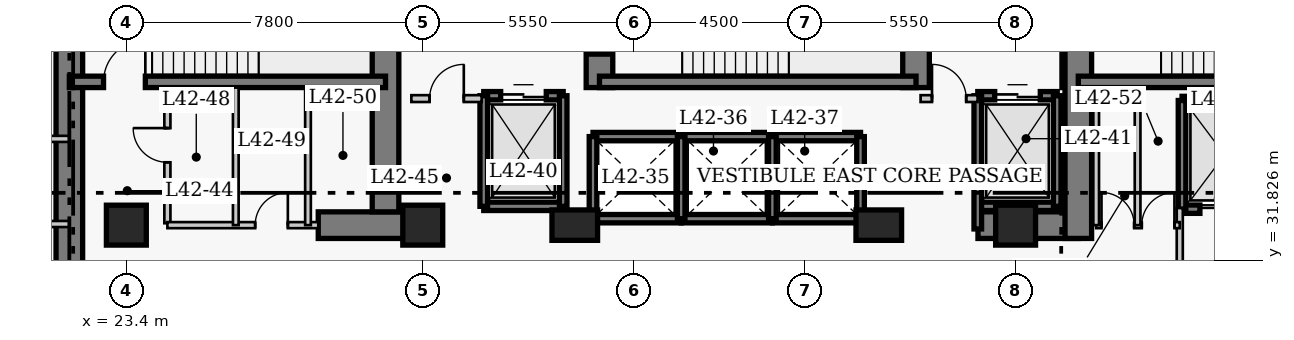
"""IFC4 building model, lengths in metres.
Left out: names, types, materials, properties, quantities, classifications, styles, units other than length and angle.
Written with IfcOpenShell. Run it as: python <this file> out.ifc"""

import sys

from ifc_helpers import new_model, si_unit, direction, frame, frame_2d, origin, origin_2d, place, context, subcontext, project, spatial, rectangle, extrude, element, fill, save


model = new_model("IFC4")
c1 = context("Model", 3, precision=1e-05, world=origin(), true_north=direction((0.0, 1.0)))
c2 = subcontext(c1, "Body", "Model", "MODEL_VIEW")
j1 = project(units=[si_unit("LENGTHUNIT", "METRE"), si_unit("PLANEANGLEUNIT", "RADIAN")], contexts=[c1])
p1 = place(None, origin())
s1 = spatial("IfcSite", under=j1, at=p1, CompositionType="ELEMENT")
p2 = place(p1, origin())
s2 = spatial("IfcBuilding", under=s1, at=p2, CompositionType="ELEMENT")
p3 = place(p2, frame((0.0, 0.0, 168.8)))
s3 = spatial("IfcBuildingStorey", under=s2, at=p3, CompositionType="ELEMENT", Elevation=168.8)
p4 = place(p3, frame((21.9, 27.05, 0.0), z_axis=(0.0, 0.0, 1.0), x_axis=(0.0, 1.0, 0.0)))
e1 = element("IfcWall", 1, at=p4, inside=s3, PredefinedType="SHEAR", context=c2, shape_type="SweptSolid", body=[
    extrude(rectangle(XDim=13.62, YDim=0.7, at=frame_2d((6.81, 0.0))), origin(), (0.0, 0.0, 1.0), 3.8),
])
p5 = place(p3, frame((28.45, 32.75, 0.0), z_axis=(0.0, 0.0, 1.0), x_axis=(1.0, 0.0, 0.0)))
e2 = element("IfcWall", 2, at=p5, inside=s3, PredefinedType="SHEAR", context=c2, shape_type="SweptSolid", body=[
    extrude(rectangle(XDim=2.4, YDim=0.7, at=frame_2d((1.2, 0.0))), origin(), (0.0, 0.0, 1.0), 3.8),
])
p6 = place(p3, frame((45.81, 32.75, 0.0), z_axis=(0.0, 0.0, 1.0), x_axis=(1.0, 0.0, 0.0)))
e3 = element("IfcWall", 3, at=p6, inside=s3, PredefinedType="SHEAR", context=c2, shape_type="SweptSolid", body=[
    extrude(rectangle(XDim=2.64, YDim=0.7, at=frame_2d((1.32, 0.0))), origin(), (0.0, 0.0, 1.0), 3.8),
])
p7 = place(p3, frame((30.22, 33.1, 0.0), z_axis=(0.0, 0.0, 1.0), x_axis=(0.0, 1.0, 0.0)))
e4 = element("IfcWall", 4, at=p7, inside=s3, PredefinedType="SHEAR", context=c2, shape_type="SweptSolid", body=[
    extrude(rectangle(XDim=7.22, YDim=0.7, at=frame_2d((3.61, 0.0))), origin(), (0.0, 0.0, 1.0), 3.8),
])
p8 = place(p3, frame((35.85, 36.37, 0.0), z_axis=(0.0, 0.0, 1.0), x_axis=(0.0, 1.0, 0.0)))
e5 = element("IfcWall", 5, at=p8, inside=s3, PredefinedType="SHEAR", context=c2, shape_type="SweptSolid", body=[
    extrude(rectangle(XDim=3.95, YDim=0.7, at=frame_2d((1.975, 0.0))), origin(), (0.0, 0.0, 1.0), 3.8),
])
p9 = place(p8, frame((0.88, 0.0, 0.0)))
e6 = element("IfcOpeningElement", 6, at=p9, cuts=e5, PredefinedType="OPENING", context=c2, shape_type="SweptSolid", body=[
    extrude(rectangle(XDim=1.1, YDim=2.15, at=frame_2d((0.55, 1.075))), frame((0.0, 0.36, 0.0), z_axis=(0.0, -1.0, 0.0), x_axis=(1.0, 0.0, 0.0)), (0.0, 0.0, 1.0), 0.72),
])
p10 = place(p3, frame((44.18, 36.37, 0.0), z_axis=(0.0, 0.0, 1.0), x_axis=(0.0, 1.0, 0.0)))
e7 = element("IfcWall", 7, at=p10, inside=s3, PredefinedType="SHEAR", context=c2, shape_type="SweptSolid", body=[
    extrude(rectangle(XDim=3.95, YDim=0.7, at=frame_2d((1.975, 0.0))), origin(), (0.0, 0.0, 1.0), 3.8),
])
p11 = place(p3, frame((48.45, 32.4, 0.0), z_axis=(0.0, 0.0, 1.0), x_axis=(0.0, 1.0, 0.0)))
e8 = element("IfcWall", 8, at=p11, inside=s3, PredefinedType="SHEAR", context=c2, shape_type="SweptSolid", body=[
    extrude(rectangle(XDim=7.92, YDim=0.7, at=frame_2d((3.96, 0.0))), origin(), (0.0, 0.0, 1.0), 3.8),
])
p12 = place(p11, frame((5.8, 0.0, 0.0)))
e9 = element("IfcOpeningElement", 9, at=p12, cuts=e8, PredefinedType="OPENING", context=c2, shape_type="SweptSolid", body=[
    extrude(rectangle(XDim=1.1, YDim=2.15, at=frame_2d((0.55, 1.075))), frame((0.0, 0.36, 0.0), z_axis=(0.0, -1.0, 0.0), x_axis=(1.0, 0.0, 0.0)), (0.0, 0.0, 1.0), 0.72),
])
p13 = place(p3, frame((21.9, 36.52, 0.0), z_axis=(0.0, 0.0, 1.0), x_axis=(1.0, 0.0, 0.0)))
e10 = element("IfcWall", 10, at=p13, inside=s3, PredefinedType="SHEAR", context=c2, shape_type="SweptSolid", body=[
    extrude(rectangle(XDim=8.32, YDim=0.3, at=frame_2d((4.16, 0.0))), origin(), (0.0, 0.0, 1.0), 3.8),
])
p14 = place(p13, frame((0.9, 0.0, 0.0)))
e11 = element("IfcOpeningElement", 11, at=p14, cuts=e10, PredefinedType="OPENING", context=c2, shape_type="SweptSolid", body=[
    extrude(rectangle(XDim=1.1, YDim=2.15, at=frame_2d((0.55, 1.075))), frame((0.0, 0.16, 0.0), z_axis=(0.0, -1.0, 0.0), x_axis=(1.0, 0.0, 0.0)), (0.0, 0.0, 1.0), 0.32),
])
p15 = place(p3, frame((35.85, 36.52, 0.0), z_axis=(0.0, 0.0, 1.0), x_axis=(1.0, 0.0, 0.0)))
e12 = element("IfcWall", 12, at=p15, inside=s3, PredefinedType="SHEAR", context=c2, shape_type="SweptSolid", body=[
    extrude(rectangle(XDim=8.33, YDim=0.3, at=frame_2d((4.165, 0.0))), origin(), (0.0, 0.0, 1.0), 3.8),
])
p16 = place(p3, frame((48.45, 36.52, 0.0), z_axis=(0.0, 0.0, 1.0), x_axis=(1.0, 0.0, 0.0)))
e13 = element("IfcWall", 13, at=p16, inside=s3, PredefinedType="SHEAR", context=c2, shape_type="SweptSolid", body=[
    extrude(rectangle(XDim=8.42, YDim=0.3, at=frame_2d((4.21, 0.0))), origin(), (0.0, 0.0, 1.0), 3.8),
])
for number, where, z_axis, x_axis in (
    (14, (23.4, 32.75, 0.0), (0.0, 0.0, 1.0), (1.0, 0.0, 0.0)),
    (15, (31.2, 32.75, 0.0), (0.0, 0.0, 1.0), (1.0, 0.0, 0.0)),
):
    element("IfcColumn", number, at=place(p3, frame(where, z_axis=z_axis, x_axis=x_axis)), inside=s3, PredefinedType="COLUMN", context=c2, shape_type="SweptSolid", body=[
        extrude(rectangle(XDim=1.05, YDim=1.05, at=origin_2d()), origin(), (0.0, 0.0, 1.0), 3.8),
    ])
for number, where, z_axis, x_axis in (
    (16, (35.2, 32.75, 0.0), (0.0, 0.0, 1.0), (1.0, 0.0, 0.0)),
    (17, (43.2, 32.75, 0.0), (0.0, 0.0, 1.0), (1.0, 0.0, 0.0)),
):
    element("IfcColumn", number, at=place(p3, frame(where, z_axis=z_axis, x_axis=x_axis)), inside=s3, PredefinedType="COLUMN", context=c2, shape_type="SweptSolid", body=[
        extrude(rectangle(XDim=1.2, YDim=0.8, at=origin_2d()), origin(), (0.0, 0.0, 1.0), 3.8),
    ])
p17 = place(p3, frame((46.8, 32.75, 0.0), z_axis=(0.0, 0.0, 1.0), x_axis=(1.0, 0.0, 0.0)))
e18 = element("IfcColumn", 18, at=p17, inside=s3, PredefinedType="COLUMN", context=c2, shape_type="SweptSolid", body=[
    extrude(rectangle(XDim=1.05, YDim=1.05, at=origin_2d()), origin(), (0.0, 0.0, 1.0), 3.8),
])
for number, where, z_axis, x_axis in (
    (19, (35.68, 35.08, 0.0), (0.0, 0.0, 1.0), (1.0, 0.0, 0.0)),
    (20, (35.68, 32.92, 0.0), (0.0, 0.0, 1.0), (1.0, 0.0, 0.0)),
):
    element("IfcWall", number, at=place(p3, frame(where, z_axis=z_axis, x_axis=x_axis)), inside=s3, PredefinedType="SHEAR", context=c2, shape_type="SweptSolid", body=[
        extrude(rectangle(XDim=2.32, YDim=0.22, at=frame_2d((1.16, 0.0))), origin(), (0.0, 0.0, 1.0), 3.8),
    ])
p18 = place(p3, frame((35.68, 32.92, 0.0), z_axis=(0.0, 0.0, 1.0), x_axis=(0.0, 1.0, 0.0)))
e21 = element("IfcWall", 21, at=p18, inside=s3, PredefinedType="SHEAR", context=c2, shape_type="SweptSolid", body=[
    extrude(rectangle(XDim=2.16, YDim=0.2, at=frame_2d((1.08, 0.0))), origin(), (0.0, 0.0, 1.0), 3.8),
])
for number, where, z_axis, x_axis in (
    (22, (38.0, 35.08, 0.0), (0.0, 0.0, 1.0), (1.0, 0.0, 0.0)),
    (23, (38.0, 32.92, 0.0), (0.0, 0.0, 1.0), (1.0, 0.0, 0.0)),
):
    element("IfcWall", number, at=place(p3, frame(where, z_axis=z_axis, x_axis=x_axis)), inside=s3, PredefinedType="SHEAR", context=c2, shape_type="SweptSolid", body=[
        extrude(rectangle(XDim=2.4, YDim=0.22, at=frame_2d((1.2, 0.0))), origin(), (0.0, 0.0, 1.0), 3.8),
    ])
p19 = place(p3, frame((38.0, 32.92, 0.0), z_axis=(0.0, 0.0, 1.0), x_axis=(0.0, 1.0, 0.0)))
e24 = element("IfcWall", 24, at=p19, inside=s3, PredefinedType="SHEAR", context=c2, shape_type="SweptSolid", body=[
    extrude(rectangle(XDim=2.16, YDim=0.2, at=frame_2d((1.08, 0.0))), origin(), (0.0, 0.0, 1.0), 3.8),
])
for number, where, z_axis, x_axis in (
    (25, (40.4, 35.08, 0.0), (0.0, 0.0, 1.0), (1.0, 0.0, 0.0)),
    (26, (40.4, 32.92, 0.0), (0.0, 0.0, 1.0), (1.0, 0.0, 0.0)),
):
    element("IfcWall", number, at=place(p3, frame(where, z_axis=z_axis, x_axis=x_axis)), inside=s3, PredefinedType="SHEAR", context=c2, shape_type="SweptSolid", body=[
        extrude(rectangle(XDim=2.32, YDim=0.22, at=frame_2d((1.16, 0.0))), origin(), (0.0, 0.0, 1.0), 3.8),
    ])
for number, where, z_axis, x_axis in (
    (27, (40.4, 32.92, 0.0), (0.0, 0.0, 1.0), (0.0, 1.0, 0.0)),
    (28, (42.72, 32.92, 0.0), (0.0, 0.0, 1.0), (0.0, 1.0, 0.0)),
):
    element("IfcWall", number, at=place(p3, frame(where, z_axis=z_axis, x_axis=x_axis)), inside=s3, PredefinedType="SHEAR", context=c2, shape_type="SweptSolid", body=[
        extrude(rectangle(XDim=2.16, YDim=0.2, at=frame_2d((1.08, 0.0))), origin(), (0.0, 0.0, 1.0), 3.8),
    ])
p20 = place(p3, frame((51.18, 36.03, 0.0), z_axis=(0.0, 0.0, 1.0), x_axis=(1.0, 0.0, 0.0)))
e29 = element("IfcWall", 29, at=p20, inside=s3, PredefinedType="SHEAR", context=c2, shape_type="SweptSolid", body=[
    extrude(rectangle(XDim=2.42, YDim=0.22, at=frame_2d((1.21, 0.0))), origin(), (0.0, 0.0, 1.0), 3.8),
])
p21 = place(p3, frame((51.18, 33.17, 0.0), z_axis=(0.0, 0.0, 1.0), x_axis=(1.0, 0.0, 0.0)))
e30 = element("IfcWall", 30, at=p21, inside=s3, PredefinedType="SHEAR", context=c2, shape_type="SweptSolid", body=[
    extrude(rectangle(XDim=2.42, YDim=0.22, at=frame_2d((1.21, 0.0))), origin(), (0.0, 0.0, 1.0), 3.8),
])
p22 = place(p21, frame((0.47, 0.0, 0.0)))
e31 = element("IfcOpeningElement", 31, at=p22, cuts=e30, PredefinedType="OPENING", context=c2, shape_type="SweptSolid", body=[
    extrude(rectangle(XDim=1.3, YDim=2.15, at=frame_2d((0.65, 1.075))), frame((0.0, 0.12, 0.0), z_axis=(0.0, -1.0, 0.0), x_axis=(1.0, 0.0, 0.0)), (0.0, 0.0, 1.0), 0.24),
])
p23 = place(p3, frame((51.18, 33.17, 0.0), z_axis=(0.0, 0.0, 1.0), x_axis=(0.0, 1.0, 0.0)))
e32 = element("IfcWall", 32, at=p23, inside=s3, PredefinedType="SHEAR", context=c2, shape_type="SweptSolid", body=[
    extrude(rectangle(XDim=2.86, YDim=0.2, at=frame_2d((1.43, 0.0))), origin(), (0.0, 0.0, 1.0), 3.8),
])
p24 = place(p3, frame((32.805, 36.155, 0.0), z_axis=(0.0, 0.0, 1.0), x_axis=(1.0, 0.0, 0.0)))
e33 = element("IfcWall", 33, at=p24, inside=s3, PredefinedType="SHEAR", context=c2, shape_type="SweptSolid", body=[
    extrude(rectangle(XDim=2.09, YDim=0.22, at=frame_2d((1.045, 0.0))), origin(), (0.0, 0.0, 1.0), 3.8),
])
p25 = place(p24, frame((0.445, 0.0, 0.0)))
e34 = element("IfcOpeningElement", 34, at=p25, cuts=e33, PredefinedType="OPENING", context=c2, shape_type="SweptSolid", body=[
    extrude(rectangle(XDim=1.2, YDim=2.15, at=frame_2d((0.6, 1.075))), frame((0.0, 0.12, 0.0), z_axis=(0.0, -1.0, 0.0), x_axis=(1.0, 0.0, 0.0)), (0.0, 0.0, 1.0), 0.24),
])
p26 = place(p3, frame((32.805, 33.245, 0.0), z_axis=(0.0, 0.0, 1.0), x_axis=(1.0, 0.0, 0.0)))
e35 = element("IfcWall", 35, at=p26, inside=s3, PredefinedType="SHEAR", context=c2, shape_type="SweptSolid", body=[
    extrude(rectangle(XDim=2.09, YDim=0.22, at=frame_2d((1.045, 0.0))), origin(), (0.0, 0.0, 1.0), 3.8),
])
for number, where, z_axis, x_axis in (
    (36, (32.805, 33.245, 0.0), (0.0, 0.0, 1.0), (0.0, 1.0, 0.0)),
    (37, (34.895, 33.245, 0.0), (0.0, 0.0, 1.0), (0.0, 1.0, 0.0)),
):
    element("IfcWall", number, at=place(p3, frame(where, z_axis=z_axis, x_axis=x_axis)), inside=s3, PredefinedType="SHEAR", context=c2, shape_type="SweptSolid", body=[
        extrude(rectangle(XDim=2.91, YDim=0.2, at=frame_2d((1.455, 0.0))), origin(), (0.0, 0.0, 1.0), 3.8),
    ])
p27 = place(p3, frame((45.805, 36.155, 0.0), z_axis=(0.0, 0.0, 1.0), x_axis=(1.0, 0.0, 0.0)))
e38 = element("IfcWall", 38, at=p27, inside=s3, PredefinedType="SHEAR", context=c2, shape_type="SweptSolid", body=[
    extrude(rectangle(XDim=2.09, YDim=0.22, at=frame_2d((1.045, 0.0))), origin(), (0.0, 0.0, 1.0), 3.8),
])
p28 = place(p27, frame((0.445, 0.0, 0.0)))
e39 = element("IfcOpeningElement", 39, at=p28, cuts=e38, PredefinedType="OPENING", context=c2, shape_type="SweptSolid", body=[
    extrude(rectangle(XDim=1.2, YDim=2.15, at=frame_2d((0.6, 1.075))), frame((0.0, 0.12, 0.0), z_axis=(0.0, -1.0, 0.0), x_axis=(1.0, 0.0, 0.0)), (0.0, 0.0, 1.0), 0.24),
])
p29 = place(p3, frame((45.805, 33.245, 0.0), z_axis=(0.0, 0.0, 1.0), x_axis=(1.0, 0.0, 0.0)))
e40 = element("IfcWall", 40, at=p29, inside=s3, PredefinedType="SHEAR", context=c2, shape_type="SweptSolid", body=[
    extrude(rectangle(XDim=2.09, YDim=0.22, at=frame_2d((1.045, 0.0))), origin(), (0.0, 0.0, 1.0), 3.8),
])
p30 = place(p3, frame((45.805, 32.65, 0.0), z_axis=(0.0, 0.0, 1.0), x_axis=(0.0, 1.0, 0.0)))
e41 = element("IfcWall", 41, at=p30, inside=s3, PredefinedType="SHEAR", context=c2, shape_type="SweptSolid", body=[
    extrude(rectangle(XDim=3.505, YDim=0.2, at=frame_2d((1.752, 0.0))), origin(), (0.0, 0.0, 1.0), 3.8),
])
p31 = place(p3, frame((47.895, 33.245, 0.0), z_axis=(0.0, 0.0, 1.0), x_axis=(0.0, 1.0, 0.0)))
e42 = element("IfcWall", 42, at=p31, inside=s3, PredefinedType="SHEAR", context=c2, shape_type="SweptSolid", body=[
    extrude(rectangle(XDim=2.91, YDim=0.2, at=frame_2d((1.455, 0.0))), origin(), (0.0, 0.0, 1.0), 3.8),
])
p32 = place(p3, frame((30.9, 36.08, 0.0), z_axis=(0.0, 0.0, 1.0), x_axis=(1.0, 0.0, 0.0)))
e43 = element("IfcWall", 43, at=p32, inside=s3, PredefinedType="PARTITIONING", context=c2, shape_type="SweptSolid", body=[
    extrude(rectangle(XDim=1.85, YDim=0.18, at=frame_2d((0.925, 0.0))), origin(), (0.0, 0.0, 1.0), 3.55),
])
p33 = place(p32, frame((0.48, 0.0, 0.0)))
e44 = element("IfcOpeningElement", 44, at=p33, cuts=e43, PredefinedType="OPENING", context=c2, shape_type="SweptSolid", body=[
    extrude(rectangle(XDim=0.9, YDim=2.15, at=frame_2d((0.45, 1.075))), frame((0.0, 0.1, 0.0), z_axis=(0.0, -1.0, 0.0), x_axis=(1.0, 0.0, 0.0)), (0.0, 0.0, 1.0), 0.2),
])
p34 = place(p3, frame((44.3, 36.08, 0.0), z_axis=(0.0, 0.0, 1.0), x_axis=(1.0, 0.0, 0.0)))
e45 = element("IfcWall", 45, at=p34, inside=s3, PredefinedType="PARTITIONING", context=c2, shape_type="SweptSolid", body=[
    extrude(rectangle(XDim=1.5, YDim=0.18, at=frame_2d((0.75, 0.0))), origin(), (0.0, 0.0, 1.0), 3.55),
])
p35 = place(p34, frame((0.3, 0.0, 0.0)))
e46 = element("IfcOpeningElement", 46, at=p35, cuts=e45, PredefinedType="OPENING", context=c2, shape_type="SweptSolid", body=[
    extrude(rectangle(XDim=0.9, YDim=2.15, at=frame_2d((0.45, 1.075))), frame((0.0, 0.1, 0.0), z_axis=(0.0, -1.0, 0.0), x_axis=(1.0, 0.0, 0.0)), (0.0, 0.0, 1.0), 0.2),
])
p36 = place(p3, frame((24.48, 32.8, 0.0), z_axis=(0.0, 0.0, 1.0), x_axis=(0.0, 1.0, 0.0)))
e47 = element("IfcWall", 47, at=p36, inside=s3, PredefinedType="PARTITIONING", context=c2, shape_type="SweptSolid", body=[
    extrude(rectangle(XDim=3.57, YDim=0.16, at=frame_2d((1.785, 0.0))), origin(), (0.0, 0.0, 1.0), 3.55),
])
p37 = place(p36, frame((1.604, 0.0, 0.0)))
e48 = element("IfcOpeningElement", 48, at=p37, cuts=e47, PredefinedType="OPENING", context=c2, shape_type="SweptSolid", body=[
    extrude(rectangle(XDim=0.9, YDim=2.1, at=frame_2d((0.45, 1.05))), frame((0.0, 0.09, 0.0), z_axis=(0.0, -1.0, 0.0), x_axis=(1.0, 0.0, 0.0)), (0.0, 0.0, 1.0), 0.18),
])
p38 = place(p3, frame((51.12, 29.5, 0.0), z_axis=(0.0, 0.0, 1.0), x_axis=(0.0, 1.0, 0.0)))
e49 = element("IfcWall", 49, at=p38, inside=s3, PredefinedType="PARTITIONING", context=c2, shape_type="SweptSolid", body=[
    extrude(rectangle(XDim=3.7, YDim=0.16, at=frame_2d((1.85, 0.0))), origin(), (0.0, 0.0, 1.0), 3.55),
])
p39 = place(p38, frame((0.9, 0.0, 0.0)))
e50 = element("IfcOpeningElement", 50, at=p39, cuts=e49, PredefinedType="OPENING", context=c2, shape_type="SweptSolid", body=[
    extrude(rectangle(XDim=1.1, YDim=2.15, at=frame_2d((0.55, 1.075))), frame((0.0, 0.09, 0.0), z_axis=(0.0, -1.0, 0.0), x_axis=(1.0, 0.0, 0.0)), (0.0, 0.0, 1.0), 0.18),
])
p40 = place(p3, frame((24.48, 32.75, 0.0), z_axis=(0.0, 0.0, 1.0), x_axis=(1.0, 0.0, 0.0)))
e51 = element("IfcWall", 51, at=p40, inside=s3, PredefinedType="PARTITIONING", context=c2, shape_type="SweptSolid", body=[
    extrude(rectangle(XDim=3.97, YDim=0.16, at=frame_2d((1.985, 0.0))), origin(), (0.0, 0.0, 1.0), 3.55),
])
p41 = place(p40, frame((2.31, 0.0, 0.0)))
e52 = element("IfcOpeningElement", 52, at=p41, cuts=e51, PredefinedType="OPENING", context=c2, shape_type="SweptSolid", body=[
    extrude(rectangle(XDim=0.86, YDim=2.05, at=frame_2d((0.43, 1.025))), frame((0.0, 0.09, 0.0), z_axis=(0.0, -1.0, 0.0), x_axis=(1.0, 0.0, 0.0)), (0.0, 0.0, 1.0), 0.18),
])
p42 = place(p3, frame((48.92, 32.75, 0.0), z_axis=(0.0, 0.0, 1.0), x_axis=(1.0, 0.0, 0.0)))
e53 = element("IfcWall", 53, at=p42, inside=s3, PredefinedType="PARTITIONING", context=c2, shape_type="SweptSolid", body=[
    extrude(rectangle(XDim=2.2, YDim=0.16, at=frame_2d((1.1, 0.0))), origin(), (0.0, 0.0, 1.0), 3.55),
])
p43 = place(p42, frame((0.14, 0.0, 0.0)))
e54 = element("IfcOpeningElement", 54, at=p43, cuts=e53, PredefinedType="OPENING", context=c2, shape_type="SweptSolid", body=[
    extrude(rectangle(XDim=0.86, YDim=2.05, at=frame_2d((0.43, 1.025))), frame((0.0, 0.09, 0.0), z_axis=(0.0, -1.0, 0.0), x_axis=(1.0, 0.0, 0.0)), (0.0, 0.0, 1.0), 0.18),
])
p44 = place(p42, frame((1.2, 0.0, 0.0)))
e55 = element("IfcOpeningElement", 55, at=p44, cuts=e53, PredefinedType="OPENING", context=c2, shape_type="SweptSolid", body=[
    extrude(rectangle(XDim=0.86, YDim=2.05, at=frame_2d((0.43, 1.025))), frame((0.0, 0.09, 0.0), z_axis=(0.0, -1.0, 0.0), x_axis=(1.0, 0.0, 0.0)), (0.0, 0.0, 1.0), 0.18),
])
for number, where, z_axis, x_axis in (
    (56, (48.92, 32.75, 0.0), (0.0, 0.0, 1.0), (0.0, 1.0, 0.0)),
    (57, (26.28, 32.75, 0.0), (0.0, 0.0, 1.0), (0.0, 1.0, 0.0)),
    (58, (28.18, 32.75, 0.0), (0.0, 0.0, 1.0), (0.0, 1.0, 0.0)),
    (59, (50.01, 32.75, 0.0), (0.0, 0.0, 1.0), (0.0, 1.0, 0.0)),
):
    element("IfcWall", number, at=place(p3, frame(where, z_axis=z_axis, x_axis=x_axis)), inside=s3, PredefinedType="PARTITIONING", context=c2, shape_type="SweptSolid", body=[
        extrude(rectangle(XDim=3.62, YDim=0.15, at=frame_2d((1.81, 0.0))), origin(), (0.0, 0.0, 1.0), 3.55),
    ])
for number, where, z_axis, x_axis in (
    (60, (19.41, 35.02, 0.0), (0.0, 0.0, 1.0), (1.0, 0.0, 0.0)),
    (61, (19.41, 32.78, 0.0), (0.0, 0.0, 1.0), (1.0, 0.0, 0.0)),
):
    element("IfcWall", number, at=place(p3, frame(where, z_axis=z_axis, x_axis=x_axis)), inside=s3, PredefinedType="PARTITIONING", context=c2, shape_type="SweptSolid", body=[
        extrude(rectangle(XDim=2.49, YDim=0.16, at=frame_2d((1.245, 0.0))), origin(), (0.0, 0.0, 1.0), 3.55),
    ])
p45 = place(p22, origin())
e62 = element("IfcDoor", 62, at=p45, inside=s3, OperationType="DOUBLE_DOOR_SLIDING", PredefinedType="DOOR", context=c2, shape_type="SweptSolid", body=[
    extrude(rectangle(XDim=1.3, YDim=2.15, at=frame_2d((0.65, 1.075))), frame((0.0, 0.025, 0.0), z_axis=(0.0, -1.0, 0.0), x_axis=(1.0, 0.0, 0.0)), (0.0, 0.0, 1.0), 0.05),
])
fill(e31, e62)
p46 = place(p25, origin())
e63 = element("IfcDoor", 63, at=p46, inside=s3, OperationType="DOUBLE_DOOR_SLIDING", PredefinedType="DOOR", context=c2, shape_type="SweptSolid", body=[
    extrude(rectangle(XDim=1.2, YDim=2.15, at=frame_2d((0.6, 1.075))), frame((0.0, 0.025, 0.0), z_axis=(0.0, -1.0, 0.0), x_axis=(1.0, 0.0, 0.0)), (0.0, 0.0, 1.0), 0.05),
])
fill(e34, e63)
p47 = place(p28, origin())
e64 = element("IfcDoor", 64, at=p47, inside=s3, OperationType="DOUBLE_DOOR_SLIDING", PredefinedType="DOOR", context=c2, shape_type="SweptSolid", body=[
    extrude(rectangle(XDim=1.2, YDim=2.15, at=frame_2d((0.6, 1.075))), frame((0.0, 0.025, 0.0), z_axis=(0.0, -1.0, 0.0), x_axis=(1.0, 0.0, 0.0)), (0.0, 0.0, 1.0), 0.05),
])
fill(e39, e64)
p48 = place(p33, origin())
e65 = element("IfcDoor", 65, at=p48, inside=s3, OperationType="SINGLE_SWING_RIGHT", PredefinedType="DOOR", context=c2, shape_type="SweptSolid", body=[
    extrude(rectangle(XDim=0.9, YDim=2.15, at=frame_2d((0.45, 1.075))), frame((0.0, 0.025, 0.0), z_axis=(0.0, -1.0, 0.0), x_axis=(1.0, 0.0, 0.0)), (0.0, 0.0, 1.0), 0.05),
])
fill(e44, e65)
p49 = place(p35, origin())
e66 = element("IfcDoor", 66, at=p49, inside=s3, OperationType="SINGLE_SWING_LEFT", PredefinedType="DOOR", context=c2, shape_type="SweptSolid", body=[
    extrude(rectangle(XDim=0.9, YDim=2.15, at=frame_2d((0.45, 1.075))), frame((0.0, 0.025, 0.0), z_axis=(0.0, -1.0, 0.0), x_axis=(1.0, 0.0, 0.0)), (0.0, 0.0, 1.0), 0.05),
])
fill(e46, e66)
p50 = place(p37, origin())
e67 = element("IfcDoor", 67, at=p50, inside=s3, OperationType="SINGLE_SWING_RIGHT", PredefinedType="DOOR", context=c2, shape_type="SweptSolid", body=[
    extrude(rectangle(XDim=0.9, YDim=2.1, at=frame_2d((0.45, 1.05))), frame((0.0, 0.025, 0.0), z_axis=(0.0, -1.0, 0.0), x_axis=(1.0, 0.0, 0.0)), (0.0, 0.0, 1.0), 0.05),
])
fill(e48, e67)
p51 = place(p41, origin())
e68 = element("IfcDoor", 68, at=p51, inside=s3, OperationType="SINGLE_SWING_RIGHT", PredefinedType="DOOR", context=c2, shape_type="SweptSolid", body=[
    extrude(rectangle(XDim=0.86, YDim=2.05, at=frame_2d((0.43, 1.025))), frame((0.0, 0.025, 0.0), z_axis=(0.0, -1.0, 0.0), x_axis=(1.0, 0.0, 0.0)), (0.0, 0.0, 1.0), 0.05),
])
fill(e52, e68)
p52 = place(p43, origin())
e69 = element("IfcDoor", 69, at=p52, inside=s3, OperationType="SINGLE_SWING_LEFT", PredefinedType="DOOR", context=c2, shape_type="SweptSolid", body=[
    extrude(rectangle(XDim=0.86, YDim=2.05, at=frame_2d((0.43, 1.025))), frame((0.0, 0.025, 0.0), z_axis=(0.0, -1.0, 0.0), x_axis=(1.0, 0.0, 0.0)), (0.0, 0.0, 1.0), 0.05),
])
fill(e54, e69)
p53 = place(p44, origin())
e70 = element("IfcDoor", 70, at=p53, inside=s3, OperationType="SINGLE_SWING_RIGHT", PredefinedType="DOOR", context=c2, shape_type="SweptSolid", body=[
    extrude(rectangle(XDim=0.86, YDim=2.05, at=frame_2d((0.43, 1.025))), frame((0.0, 0.025, 0.0), z_axis=(0.0, -1.0, 0.0), x_axis=(1.0, 0.0, 0.0)), (0.0, 0.0, 1.0), 0.05),
])
fill(e55, e70)
p54 = place(p14, origin())
e71 = element("IfcDoor", 71, at=p54, inside=s3, OperationType="SINGLE_SWING_RIGHT", PredefinedType="DOOR", context=c2, shape_type="SweptSolid", body=[
    extrude(rectangle(XDim=1.1, YDim=2.15, at=frame_2d((0.55, 1.075))), frame((0.0, 0.025, 0.0), z_axis=(0.0, -1.0, 0.0), x_axis=(1.0, 0.0, 0.0)), (0.0, 0.0, 1.0), 0.05),
])
fill(e11, e71)
p55 = place(p9, origin())
e72 = element("IfcDoor", 72, at=p55, inside=s3, OperationType="SINGLE_SWING_RIGHT", PredefinedType="DOOR", context=c2, shape_type="SweptSolid", body=[
    extrude(rectangle(XDim=1.1, YDim=2.15, at=frame_2d((0.55, 1.075))), frame((0.0, 0.025, 0.0), z_axis=(0.0, -1.0, 0.0), x_axis=(1.0, 0.0, 0.0)), (0.0, 0.0, 1.0), 0.05),
])
fill(e6, e72)
save(model, sys.argv[1])
